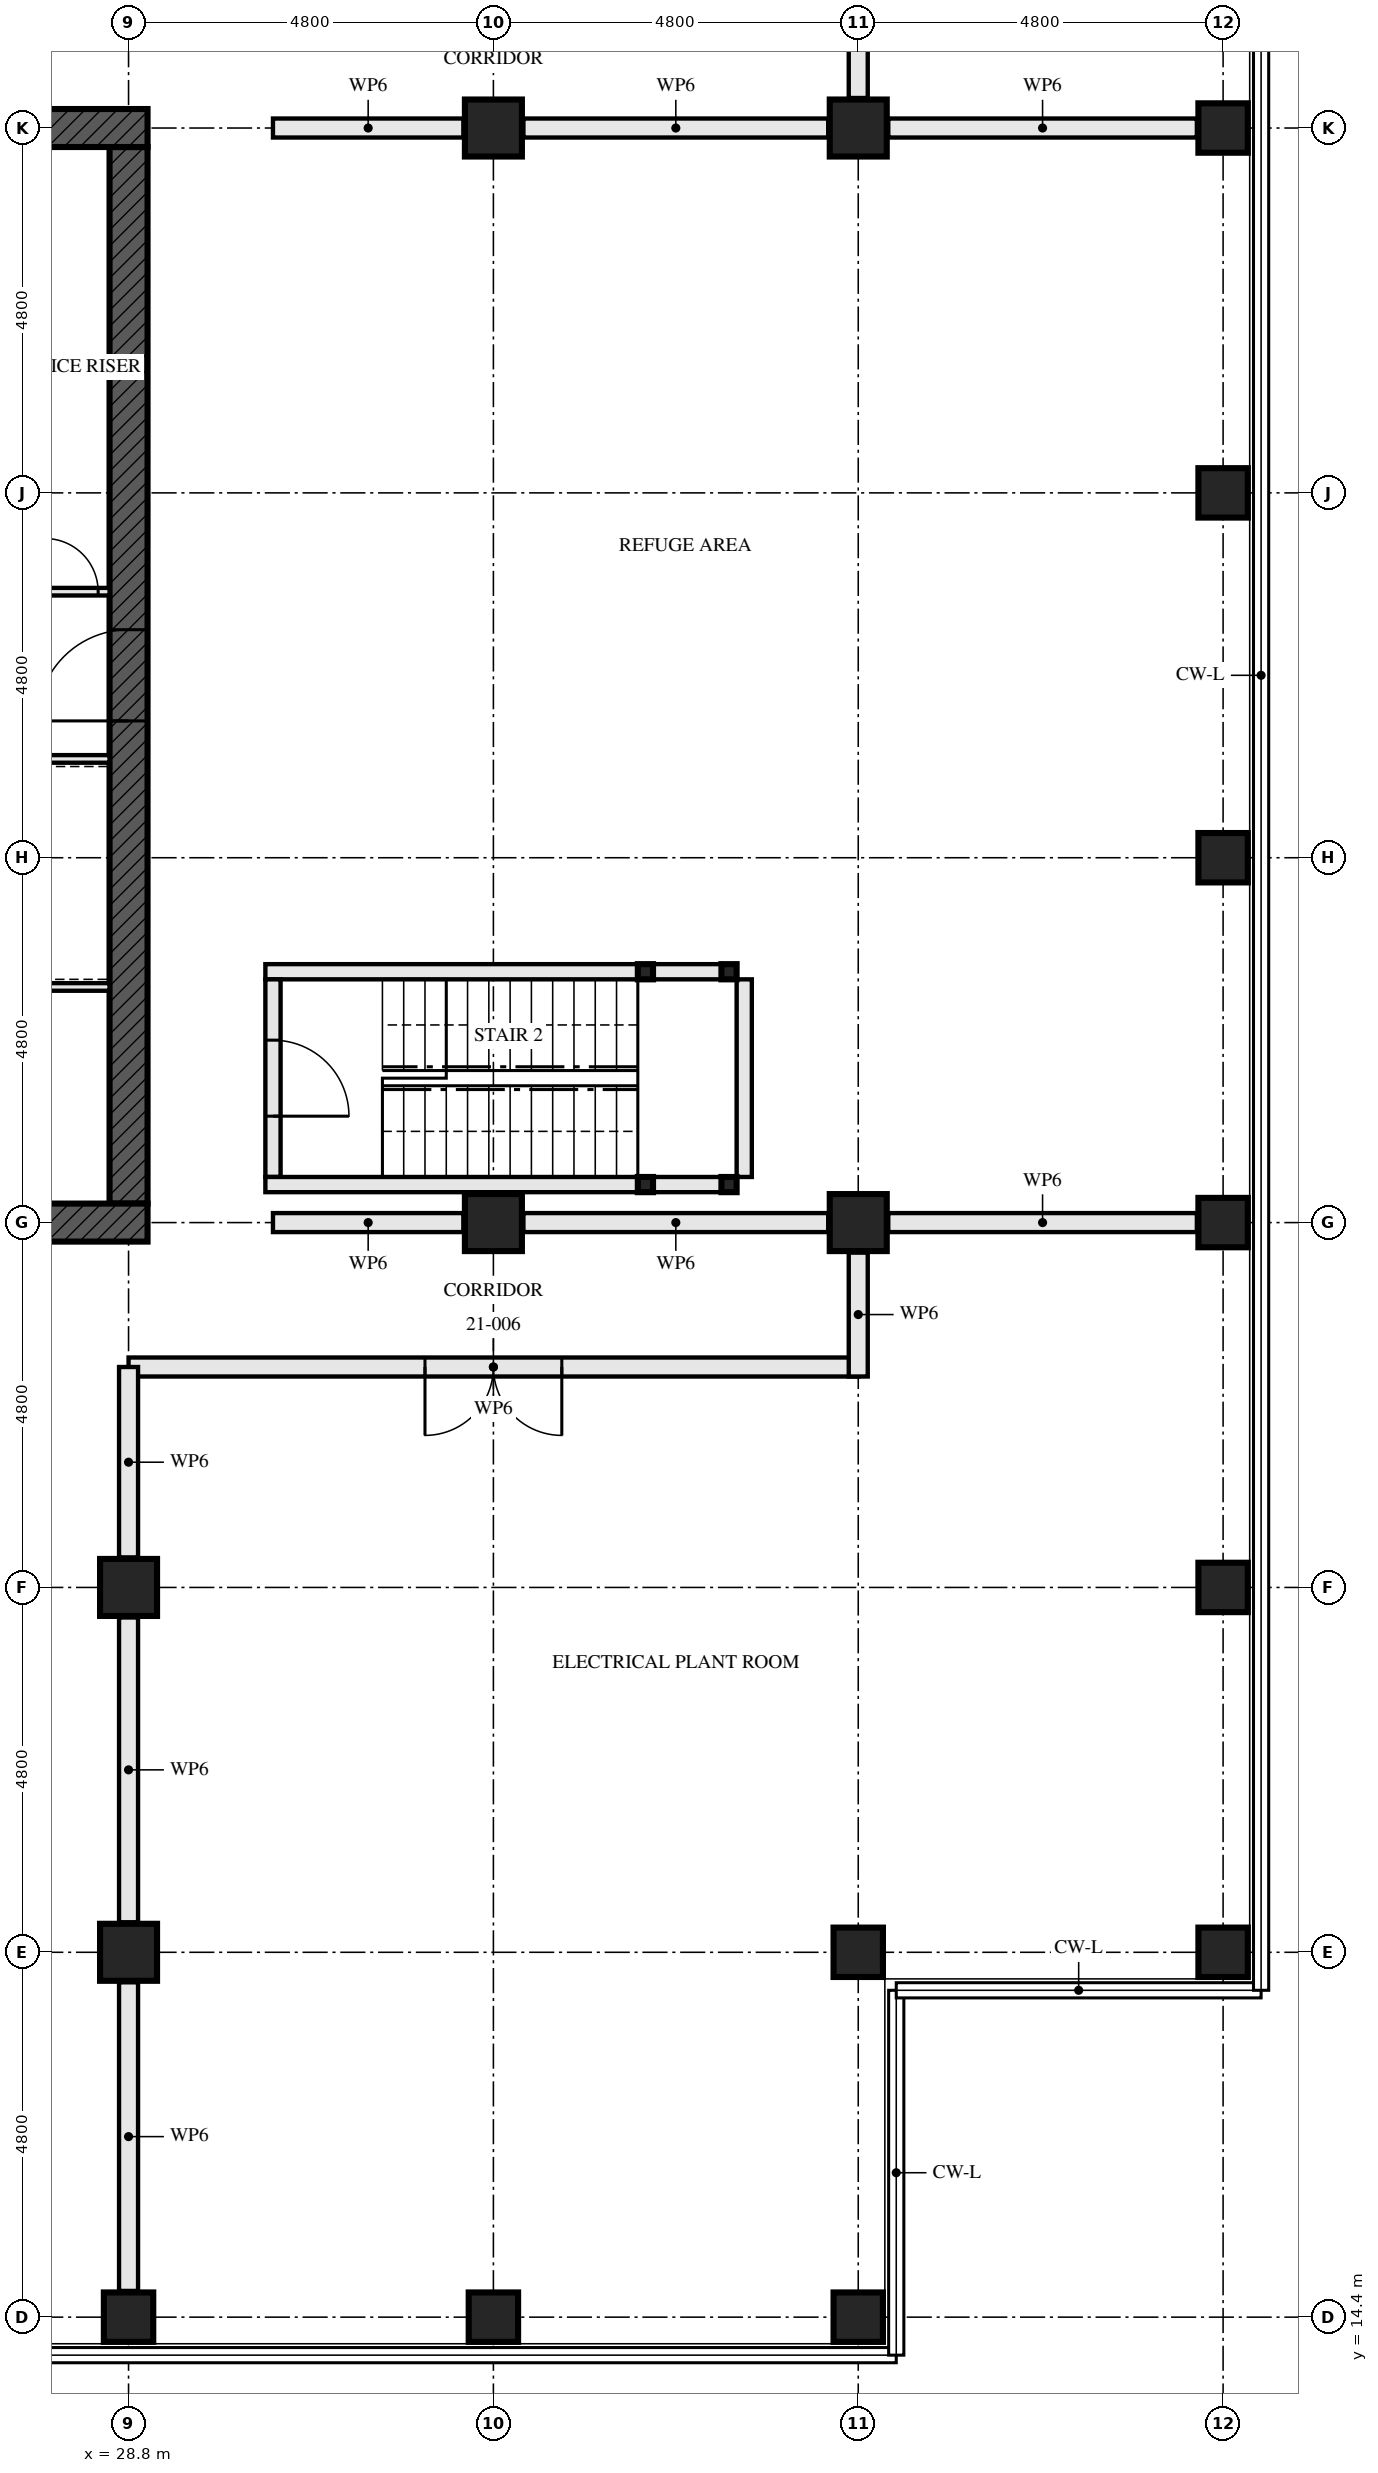
"""IFC4 building model, lengths in metres.
Left out: names, types, materials, properties, quantities, classifications, styles, units other than length and angle.
Written with IfcOpenShell. Run it as: python <this file> out.ifc"""

import sys

from ifc_helpers import new_model, si_unit, direction, frame, frame_2d, origin, origin_2d, place, context, subcontext, project, spatial, rectangle, hollow_rectangle, extrude, element, fill, save


model = new_model("IFC4")
c1 = context("Model", 3, precision=1e-05, world=origin(), true_north=direction((0.0, 1.0)))
c2 = subcontext(c1, "Body", "Model", "MODEL_VIEW")
j1 = project(units=[si_unit("LENGTHUNIT", "METRE"), si_unit("PLANEANGLEUNIT", "RADIAN")], contexts=[c1])
p1 = place(None, origin())
s1 = spatial("IfcSite", under=j1, at=p1, CompositionType="ELEMENT")
p2 = place(p1, origin())
s2 = spatial("IfcBuilding", under=s1, at=p2, CompositionType="ELEMENT")
p3 = place(p2, frame((0.0, 0.0, 79.5)))
s3 = spatial("IfcBuildingStorey", under=s2, at=p3, CompositionType="ELEMENT", Elevation=79.5)
p4 = place(p3, frame((28.8, 14.4, 0.0), z_axis=(0.0, 0.0, 1.0), x_axis=(0.0, 1.0, 0.0)))
e1 = element("IfcColumn", 1, at=p4, inside=s3, PredefinedType="COLUMN", context=c2, shape_type="SweptSolid", body=[
    extrude(hollow_rectangle(XDim=0.65, YDim=0.65, WallThickness=0.08, at=origin_2d()), origin(), (0.0, 0.0, 1.0), 4.5),
])
for number, where, z_axis, x_axis in (
    (2, (28.8, 19.2, 0.0), (0.0, 0.0, 1.0), (1.0, 0.0, 0.0)),
    (3, (28.8, 24.0, 0.0), (0.0, 0.0, 1.0), (1.0, 0.0, 0.0)),
):
    element("IfcColumn", number, at=place(p3, frame(where, z_axis=z_axis, x_axis=x_axis)), inside=s3, PredefinedType="COLUMN", context=c2, shape_type="SweptSolid", body=[
        extrude(hollow_rectangle(XDim=0.75, YDim=0.75, WallThickness=0.08, at=origin_2d()), origin(), (0.0, 0.0, 1.0), 4.5),
    ])
p5 = place(p3, frame((33.6, 14.4, 0.0), z_axis=(0.0, 0.0, 1.0), x_axis=(0.0, 1.0, 0.0)))
e4 = element("IfcColumn", 4, at=p5, inside=s3, PredefinedType="COLUMN", context=c2, shape_type="SweptSolid", body=[
    extrude(hollow_rectangle(XDim=0.65, YDim=0.65, WallThickness=0.08, at=origin_2d()), origin(), (0.0, 0.0, 1.0), 4.5),
])
for number, where, z_axis, x_axis in (
    (5, (33.6, 28.8, 0.0), (0.0, 0.0, 1.0), (0.0, 1.0, 0.0)),
    (6, (33.6, 43.2, 0.0), (0.0, 0.0, 1.0), (0.0, 1.0, 0.0)),
):
    element("IfcColumn", number, at=place(p3, frame(where, z_axis=z_axis, x_axis=x_axis)), inside=s3, PredefinedType="COLUMN", context=c2, shape_type="SweptSolid", body=[
        extrude(hollow_rectangle(XDim=0.75, YDim=0.75, WallThickness=0.08, at=origin_2d()), origin(), (0.0, 0.0, 1.0), 4.5),
    ])
for number, where, z_axis, x_axis in (
    (7, (38.4, 14.4, 0.0), (0.0, 0.0, 1.0), (0.0, 1.0, 0.0)),
    (8, (38.4, 19.2, 0.0), (0.0, 0.0, 1.0), (0.0, 1.0, 0.0)),
):
    element("IfcColumn", number, at=place(p3, frame(where, z_axis=z_axis, x_axis=x_axis)), inside=s3, PredefinedType="COLUMN", context=c2, shape_type="SweptSolid", body=[
        extrude(hollow_rectangle(XDim=0.65, YDim=0.65, WallThickness=0.08, at=origin_2d()), origin(), (0.0, 0.0, 1.0), 4.5),
    ])
for number, where, z_axis, x_axis in (
    (9, (38.4, 28.8, 0.0), (0.0, 0.0, 1.0), (0.0, 1.0, 0.0)),
    (10, (38.4, 43.2, 0.0), (0.0, 0.0, 1.0), (0.0, 1.0, 0.0)),
):
    element("IfcColumn", number, at=place(p3, frame(where, z_axis=z_axis, x_axis=x_axis)), inside=s3, PredefinedType="COLUMN", context=c2, shape_type="SweptSolid", body=[
        extrude(hollow_rectangle(XDim=0.75, YDim=0.75, WallThickness=0.08, at=origin_2d()), origin(), (0.0, 0.0, 1.0), 4.5),
    ])
for number, where, z_axis, x_axis in (
    (11, (43.2, 19.2, 0.0), (0.0, 0.0, 1.0), (0.0, 1.0, 0.0)),
    (12, (43.2, 24.0, 0.0), (0.0, 0.0, 1.0), (1.0, 0.0, 0.0)),
    (13, (43.2, 28.8, 0.0), (0.0, 0.0, 1.0), (0.0, 1.0, 0.0)),
    (14, (43.2, 33.6, 0.0), (0.0, 0.0, 1.0), (1.0, 0.0, 0.0)),
    (15, (43.2, 38.4, 0.0), (0.0, 0.0, 1.0), (1.0, 0.0, 0.0)),
):
    element("IfcColumn", number, at=place(p3, frame(where, z_axis=z_axis, x_axis=x_axis)), inside=s3, PredefinedType="COLUMN", context=c2, shape_type="SweptSolid", body=[
        extrude(hollow_rectangle(XDim=0.65, YDim=0.65, WallThickness=0.08, at=origin_2d()), origin(), (0.0, 0.0, 1.0), 4.5),
    ])
p6 = place(p3, frame((43.2, 43.2, 0.0), z_axis=(0.0, 0.0, 1.0), x_axis=(0.0, 1.0, 0.0)))
e16 = element("IfcColumn", 16, at=p6, inside=s3, PredefinedType="COLUMN", context=c2, shape_type="SweptSolid", body=[
    extrude(hollow_rectangle(XDim=0.65, YDim=0.65, WallThickness=0.08, at=origin_2d()), origin(), (0.0, 0.0, 1.0), 4.33),
])
p7 = place(p3, frame((14.15, 28.8, -0.25), z_axis=(0.0, 0.0, 1.0), x_axis=(1.0, 0.0, 0.0)))
e17 = element("IfcWall", 17, at=p7, inside=s3, PredefinedType="SHEAR", context=c2, shape_type="SweptSolid", body=[
    extrude(rectangle(XDim=14.9, YDim=0.5, at=frame_2d((7.45, 0.0))), origin(), (0.0, 0.0, 1.0), 4.58),
])
p8 = place(p7, frame((6.85, 0.0, 0.25)))
e18 = element("IfcOpeningElement", 18, at=p8, cuts=e17, PredefinedType="OPENING", context=c2, shape_type="SweptSolid", body=[
    extrude(rectangle(XDim=1.2, YDim=2.1, at=frame_2d((0.6, 1.05))), frame((0.0, 0.26, 0.0), z_axis=(0.0, -1.0, 0.0), x_axis=(1.0, 0.0, 0.0)), (0.0, 0.0, 1.0), 0.521),
])
p9 = place(p3, frame((29.05, 43.2, -0.25), z_axis=(0.0, 0.0, 1.0), x_axis=(-1.0, 0.0, 0.0)))
e19 = element("IfcWall", 19, at=p9, inside=s3, PredefinedType="SHEAR", context=c2, shape_type="SweptSolid", body=[
    extrude(rectangle(XDim=14.9, YDim=0.5, at=frame_2d((7.45, 0.0))), origin(), (0.0, 0.0, 1.0), 4.58),
])
p10 = place(p9, frame((6.85, 0.0, 0.25)))
e20 = element("IfcOpeningElement", 20, at=p10, cuts=e19, PredefinedType="OPENING", context=c2, shape_type="SweptSolid", body=[
    extrude(rectangle(XDim=1.2, YDim=2.1, at=frame_2d((0.6, 1.05))), frame((0.0, 0.26, 0.0), z_axis=(0.0, -1.0, 0.0), x_axis=(1.0, 0.0, 0.0)), (0.0, 0.0, 1.0), 0.521),
])
p11 = place(p3, frame((28.8, 29.05, -0.25), z_axis=(0.0, 0.0, 1.0), x_axis=(0.0, 1.0, 0.0)))
e21 = element("IfcWall", 21, at=p11, inside=s3, PredefinedType="SHEAR", context=c2, shape_type="SweptSolid", body=[
    extrude(rectangle(XDim=13.9, YDim=0.5, at=frame_2d((6.95, 0.0))), origin(), (0.0, 0.0, 1.0), 4.58),
])
p12 = place(p11, frame((6.35, 0.0, 0.25)))
e22 = element("IfcOpeningElement", 22, at=p12, cuts=e21, PredefinedType="OPENING", context=c2, shape_type="SweptSolid", body=[
    extrude(rectangle(XDim=1.2, YDim=2.1, at=frame_2d((0.6, 1.05))), frame((0.0, 0.26, 0.0), z_axis=(0.0, -1.0, 0.0), x_axis=(1.0, 0.0, 0.0)), (0.0, 0.0, 1.0), 0.521),
])
for number, where, z_axis, x_axis in (
    (23, (36.7, 29.3, 0.0), (0.0, 0.0, 1.0), (1.0, 0.0, 0.0)),
    (24, (36.7, 32.1, 0.0), (0.0, 0.0, 1.0), (1.0, 0.0, 0.0)),
    (25, (35.6, 29.3, 0.0), (0.0, 0.0, 1.0), (1.0, 0.0, 0.0)),
    (26, (35.6, 32.1, 0.0), (0.0, 0.0, 1.0), (1.0, 0.0, 0.0)),
):
    element("IfcColumn", number, at=place(p3, frame(where, z_axis=z_axis, x_axis=x_axis)), inside=s3, PredefinedType="COLUMN", context=c2, shape_type="SweptSolid", body=[
        extrude(hollow_rectangle(XDim=0.2, YDim=0.2, WallThickness=0.008, at=origin_2d()), origin(), (0.0, 0.0, 1.0), 4.33),
    ])
p13 = place(p3, frame((28.8, 26.9, 0.0), z_axis=(0.0, 0.0, 1.0), x_axis=(1.0, 0.0, 0.0)))
e27 = element("IfcWall", 27, at=p13, inside=s3, PredefinedType="SOLIDWALL", context=c2, shape_type="SweptSolid", body=[
    extrude(rectangle(XDim=9.6, YDim=0.25, at=frame_2d((4.8, 0.0))), origin(), (0.0, 0.0, 1.0), 4.33),
])
p14 = place(p13, frame((3.9, 0.0, 0.0)))
e28 = element("IfcOpeningElement", 28, at=p14, cuts=e27, PredefinedType="OPENING", context=c2, shape_type="SweptSolid", body=[
    extrude(rectangle(XDim=1.8, YDim=2.4, at=frame_2d((0.9, 1.2))), frame((0.0, 0.135, 0.0), z_axis=(0.0, -1.0, 0.0), x_axis=(1.0, 0.0, 0.0)), (0.0, 0.0, 1.0), 0.271),
])
p15 = place(p3, frame((38.4, 26.775, 0.0), z_axis=(0.0, 0.0, 1.0), x_axis=(0.0, 1.0, 0.0)))
e29 = element("IfcWall", 29, at=p15, inside=s3, PredefinedType="SOLIDWALL", context=c2, shape_type="SweptSolid", body=[
    extrude(rectangle(XDim=1.63, YDim=0.25, at=frame_2d((0.815, 0.0))), origin(), (0.0, 0.0, 1.0), 4.33),
])
p16 = place(p3, frame((36.6, 29.3, 0.0), z_axis=(0.0, 0.0, 1.0), x_axis=(-1.0, 0.0, 0.0)))
e30 = element("IfcWall", 30, at=p16, inside=s3, PredefinedType="SOLIDWALL", context=c2, shape_type="SweptSolid", body=[
    extrude(rectangle(XDim=0.9, YDim=0.2, at=frame_2d((0.45, 0.0))), origin(), (0.0, 0.0, 1.0), 3.99),
])
p17 = place(p3, frame((35.5, 29.3, 0.0), z_axis=(0.0, 0.0, 1.0), x_axis=(-1.0, 0.0, 0.0)))
e31 = element("IfcWall", 31, at=p17, inside=s3, PredefinedType="SOLIDWALL", context=c2, shape_type="SweptSolid", body=[
    extrude(rectangle(XDim=4.9, YDim=0.2, at=frame_2d((2.45, 0.0))), origin(), (0.0, 0.0, 1.0), 3.99),
])
p18 = place(p3, frame((36.6, 32.1, 0.0), z_axis=(0.0, 0.0, 1.0), x_axis=(-1.0, 0.0, 0.0)))
e32 = element("IfcWall", 32, at=p18, inside=s3, PredefinedType="SOLIDWALL", context=c2, shape_type="SweptSolid", body=[
    extrude(rectangle(XDim=0.9, YDim=0.2, at=frame_2d((0.45, 0.0))), origin(), (0.0, 0.0, 1.0), 3.99),
])
p19 = place(p3, frame((35.5, 32.1, 0.0), z_axis=(0.0, 0.0, 1.0), x_axis=(-1.0, 0.0, 0.0)))
e33 = element("IfcWall", 33, at=p19, inside=s3, PredefinedType="SOLIDWALL", context=c2, shape_type="SweptSolid", body=[
    extrude(rectangle(XDim=4.9, YDim=0.2, at=frame_2d((2.45, 0.0))), origin(), (0.0, 0.0, 1.0), 3.99),
])
p20 = place(p3, frame((36.9, 29.4, 0.0), z_axis=(0.0, 0.0, 1.0), x_axis=(0.0, 1.0, 0.0)))
e34 = element("IfcWall", 34, at=p20, inside=s3, PredefinedType="SOLIDWALL", context=c2, shape_type="SweptSolid", body=[
    extrude(rectangle(XDim=2.6, YDim=0.2, at=frame_2d((1.3, 0.0))), origin(), (0.0, 0.0, 1.0), 4.33),
])
p21 = place(p3, frame((30.7, 29.4, 0.0), z_axis=(0.0, 0.0, 1.0), x_axis=(0.0, 1.0, 0.0)))
e35 = element("IfcWall", 35, at=p21, inside=s3, PredefinedType="SOLIDWALL", context=c2, shape_type="SweptSolid", body=[
    extrude(rectangle(XDim=2.6, YDim=0.2, at=frame_2d((1.3, 0.0))), origin(), (0.0, 0.0, 1.0), 4.33),
])
p22 = place(p21, frame((0.8, 0.0, 0.0)))
e36 = element("IfcOpeningElement", 36, at=p22, cuts=e35, PredefinedType="OPENING", context=c2, shape_type="SweptSolid", body=[
    extrude(rectangle(XDim=1.0, YDim=2.1, at=frame_2d((0.5, 1.05))), frame((0.0, 0.111, 0.0), z_axis=(0.0, -1.0, 0.0), x_axis=(1.0, 0.0, 0.0)), (0.0, 0.0, 1.0), 0.221),
])
p23 = place(p3, frame((38.4, 45.225, 0.0), z_axis=(0.0, 0.0, 1.0), x_axis=(0.0, -1.0, 0.0)))
e37 = element("IfcWall", 37, at=p23, inside=s3, PredefinedType="SOLIDWALL", context=c2, shape_type="SweptSolid", body=[
    extrude(rectangle(XDim=1.63, YDim=0.25, at=frame_2d((0.815, 0.0))), origin(), (0.0, 0.0, 1.0), 4.33),
])
p24 = place(p3, frame((23.05, 34.9, 0.0), z_axis=(0.0, 0.0, 1.0), x_axis=(1.0, 0.0, 0.0)))
e38 = element("IfcWall", 38, at=p24, inside=s3, PredefinedType="SOLIDWALL", context=c2, shape_type="SweptSolid", body=[
    extrude(rectangle(XDim=5.5, YDim=0.1, at=frame_2d((2.75, 0.0))), origin(), (0.0, 0.0, 1.0), 4.33),
])
p25 = place(p3, frame((22.65, 37.1, 0.0), z_axis=(0.0, 0.0, 1.0), x_axis=(1.0, 0.0, 0.0)))
e39 = element("IfcWall", 39, at=p25, inside=s3, PredefinedType="SOLIDWALL", context=c2, shape_type="SweptSolid", body=[
    extrude(rectangle(XDim=5.9, YDim=0.1, at=frame_2d((2.95, 0.0))), origin(), (0.0, 0.0, 1.0), 4.33),
])
p26 = place(p25, frame((3.5, 0.0, 0.0)))
e40 = element("IfcOpeningElement", 40, at=p26, cuts=e39, PredefinedType="OPENING", context=c2, shape_type="SweptSolid", body=[
    extrude(rectangle(XDim=0.9, YDim=2.1, at=frame_2d((0.45, 1.05))), frame((0.0, 0.061, 0.0), z_axis=(0.0, -1.0, 0.0), x_axis=(1.0, 0.0, 0.0)), (0.0, 0.0, 1.0), 0.121),
])
p27 = place(p25, frame((5.05, 0.0, 0.0)))
e41 = element("IfcOpeningElement", 41, at=p27, cuts=e39, PredefinedType="OPENING", context=c2, shape_type="SweptSolid", body=[
    extrude(rectangle(XDim=0.7, YDim=2.1, at=frame_2d((0.35, 1.05))), frame((0.0, 0.061, 0.0), z_axis=(0.0, -1.0, 0.0), x_axis=(1.0, 0.0, 0.0)), (0.0, 0.0, 1.0), 0.121),
])
p28 = place(p3, frame((23.15, 31.9, 0.0), z_axis=(0.0, 0.0, 1.0), x_axis=(1.0, 0.0, 0.0)))
e42 = element("IfcWall", 42, at=p28, inside=s3, PredefinedType="SOLIDWALL", context=c2, shape_type="SweptSolid", body=[
    extrude(rectangle(XDim=5.4, YDim=0.1, at=frame_2d((2.7, 0.0))), origin(), (0.0, 0.0, 1.0), 4.33),
])
p29 = place(p3, frame((28.8, 14.745, 0.0), z_axis=(0.0, 0.0, 1.0), x_axis=(0.0, 1.0, 0.0)))
e43 = element("IfcWall", 43, at=p29, inside=s3, PredefinedType="SOLIDWALL", context=c2, shape_type="SweptSolid", body=[
    extrude(rectangle(XDim=4.06, YDim=0.25, at=frame_2d((2.03, 0.0))), origin(), (0.0, 0.0, 1.0), 2.82),
])
p30 = place(p3, frame((28.8, 19.595, 0.0), z_axis=(0.0, 0.0, 1.0), x_axis=(0.0, 1.0, 0.0)))
e44 = element("IfcWall", 44, at=p30, inside=s3, PredefinedType="SOLIDWALL", context=c2, shape_type="SweptSolid", body=[
    extrude(rectangle(XDim=4.01, YDim=0.25, at=frame_2d((2.005, 0.0))), origin(), (0.0, 0.0, 1.0), 2.82),
])
p31 = place(p3, frame((28.8, 24.395, 0.0), z_axis=(0.0, 0.0, 1.0), x_axis=(0.0, 1.0, 0.0)))
e45 = element("IfcWall", 45, at=p31, inside=s3, PredefinedType="SOLIDWALL", context=c2, shape_type="SweptSolid", body=[
    extrude(rectangle(XDim=2.505, YDim=0.25, at=frame_2d((1.252, 0.0))), origin(), (0.0, 0.0, 1.0), 2.82),
])
p32 = place(p3, frame((42.855, 28.8, 0.0), z_axis=(0.0, 0.0, 1.0), x_axis=(-1.0, 0.0, 0.0)))
e46 = element("IfcWall", 46, at=p32, inside=s3, PredefinedType="SOLIDWALL", context=c2, shape_type="SweptSolid", body=[
    extrude(rectangle(XDim=4.06, YDim=0.25, at=frame_2d((2.03, 0.0))), origin(), (0.0, 0.0, 1.0), 3.12),
])
p33 = place(p3, frame((38.005, 28.8, 0.0), z_axis=(0.0, 0.0, 1.0), x_axis=(-1.0, 0.0, 0.0)))
e47 = element("IfcWall", 47, at=p33, inside=s3, PredefinedType="SOLIDWALL", context=c2, shape_type="SweptSolid", body=[
    extrude(rectangle(XDim=4.01, YDim=0.25, at=frame_2d((2.005, 0.0))), origin(), (0.0, 0.0, 1.0), 3.12),
])
p34 = place(p3, frame((33.205, 28.8, 0.0), z_axis=(0.0, 0.0, 1.0), x_axis=(-1.0, 0.0, 0.0)))
e48 = element("IfcWall", 48, at=p34, inside=s3, PredefinedType="SOLIDWALL", context=c2, shape_type="SweptSolid", body=[
    extrude(rectangle(XDim=2.505, YDim=0.25, at=frame_2d((1.252, 0.0))), origin(), (0.0, 0.0, 1.0), 3.12),
])
p35 = place(p3, frame((42.855, 43.2, 0.0), z_axis=(0.0, 0.0, 1.0), x_axis=(-1.0, 0.0, 0.0)))
e49 = element("IfcWall", 49, at=p35, inside=s3, PredefinedType="SOLIDWALL", context=c2, shape_type="SweptSolid", body=[
    extrude(rectangle(XDim=4.06, YDim=0.25, at=frame_2d((2.03, 0.0))), origin(), (0.0, 0.0, 1.0), 3.12),
])
p36 = place(p3, frame((38.005, 43.2, 0.0), z_axis=(0.0, 0.0, 1.0), x_axis=(-1.0, 0.0, 0.0)))
e50 = element("IfcWall", 50, at=p36, inside=s3, PredefinedType="SOLIDWALL", context=c2, shape_type="SweptSolid", body=[
    extrude(rectangle(XDim=4.01, YDim=0.25, at=frame_2d((2.005, 0.0))), origin(), (0.0, 0.0, 1.0), 3.12),
])
p37 = place(p3, frame((33.205, 43.2, 0.0), z_axis=(0.0, 0.0, 1.0), x_axis=(-1.0, 0.0, 0.0)))
e51 = element("IfcWall", 51, at=p37, inside=s3, PredefinedType="SOLIDWALL", context=c2, shape_type="SweptSolid", body=[
    extrude(rectangle(XDim=2.505, YDim=0.25, at=frame_2d((1.252, 0.0))), origin(), (0.0, 0.0, 1.0), 3.12),
])
p38 = place(p14, frame((1.8, 0.0, 0.0), z_axis=(0.0, 0.0, 1.0), x_axis=(-1.0, 0.0, 0.0)))
e52 = element("IfcDoor", 52, at=p38, inside=s3, OperationType="DOUBLE_DOOR_SINGLE_SWING", PredefinedType="DOOR", context=c2, shape_type="SweptSolid", body=[
    extrude(rectangle(XDim=1.8, YDim=2.4, at=frame_2d((0.9, 1.2))), frame((0.0, 0.032, 0.0), z_axis=(0.0, -1.0, 0.0), x_axis=(1.0, 0.0, 0.0)), (0.0, 0.0, 1.0), 0.064),
])
fill(e28, e52)
p39 = place(p22, frame((1.0, 0.0, 0.0), z_axis=(0.0, 0.0, 1.0), x_axis=(-1.0, 0.0, 0.0)))
e53 = element("IfcDoor", 53, at=p39, inside=s3, OperationType="SINGLE_SWING_LEFT", PredefinedType="DOOR", context=c2, shape_type="SweptSolid", body=[
    extrude(rectangle(XDim=1.0, YDim=2.1, at=frame_2d((0.5, 1.05))), frame((0.0, 0.032, 0.0), z_axis=(0.0, -1.0, 0.0), x_axis=(1.0, 0.0, 0.0)), (0.0, 0.0, 1.0), 0.064),
])
fill(e36, e53)
p40 = place(p27, origin())
e54 = element("IfcDoor", 54, at=p40, inside=s3, OperationType="SINGLE_SWING_RIGHT", PredefinedType="DOOR", context=c2, shape_type="SweptSolid", body=[
    extrude(rectangle(XDim=0.7, YDim=2.1, at=frame_2d((0.35, 1.05))), frame((0.0, 0.027, 0.0), z_axis=(0.0, -1.0, 0.0), x_axis=(1.0, 0.0, 0.0)), (0.0, 0.0, 1.0), 0.054),
])
fill(e41, e54)
p41 = place(p12, origin())
e55 = element("IfcDoor", 55, at=p41, inside=s3, OperationType="SINGLE_SWING_LEFT", PredefinedType="DOOR", context=c2, shape_type="SweptSolid", body=[
    extrude(rectangle(XDim=1.2, YDim=2.1, at=frame_2d((0.6, 1.05))), frame((0.0, 0.027, 0.0), z_axis=(0.0, -1.0, 0.0), x_axis=(1.0, 0.0, 0.0)), (0.0, 0.0, 1.0), 0.054),
])
fill(e22, e55)
save(model, sys.argv[1])
